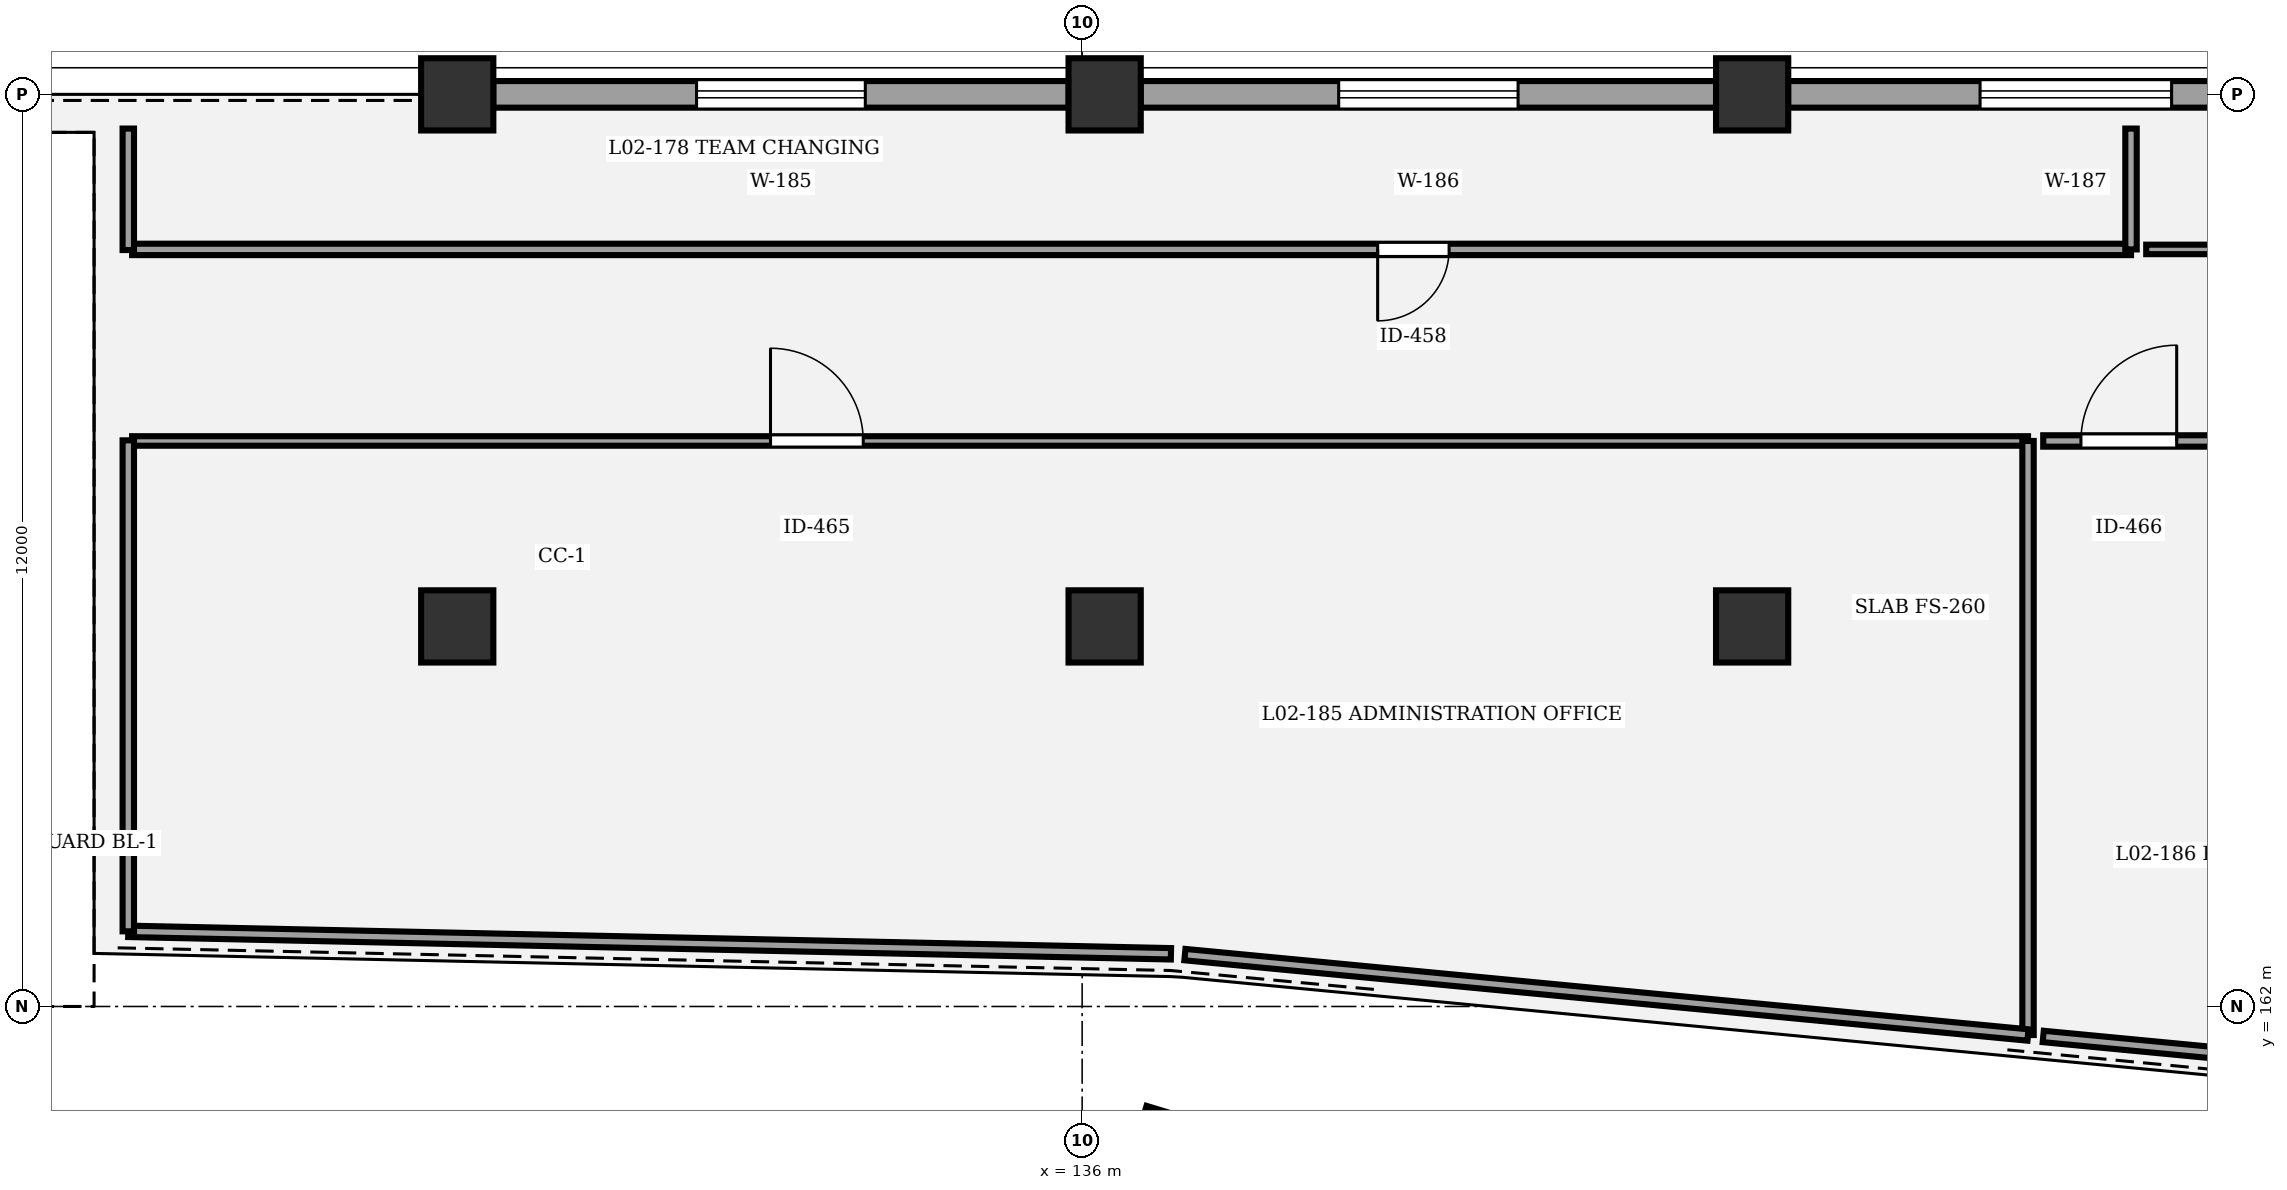
"""IFC4 building model, lengths in metres.
Left out: names, types, materials, properties, quantities, classifications, styles, units other than length and angle.
Written with IfcOpenShell. Run it as: python <this file> out.ifc"""

import sys

from ifc_helpers import new_model, si_unit, direction, frame, frame_2d, origin, origin_2d, place, context, subcontext, project, spatial, rectangle, circle, extrude, element, fill, save


model = new_model("IFC4")
c1 = context("Model", 3, precision=1e-05, world=origin(), true_north=direction((0.0, 1.0)))
c2 = subcontext(c1, "Body", "Model", "MODEL_VIEW")
j1 = project(units=[si_unit("LENGTHUNIT", "METRE"), si_unit("PLANEANGLEUNIT", "RADIAN")], contexts=[c1])
p1 = place(None, origin())
s1 = spatial("IfcSite", under=j1, at=p1, CompositionType="ELEMENT")
p2 = place(p1, origin())
s2 = spatial("IfcBuilding", under=s1, at=p2, CompositionType="ELEMENT")
p3 = place(p2, frame((0.0, 0.0, 10.2)))
s3 = spatial("IfcBuildingStorey", under=s2, at=p3, CompositionType="ELEMENT", Elevation=10.2)
p4 = place(p3, frame((137.115, 160.194, 0.0), z_axis=(0.0, 0.0, 1.0), x_axis=(0.289198876314, 0.957269037387, 0.0)))
e1 = element("IfcColumn", 1, at=p4, inside=s3, PredefinedType="COLUMN", context=c2, shape_type="SweptSolid", body=[
    extrude(rectangle(XDim=0.8, YDim=0.8, at=origin_2d()), origin(), (0.0, 0.0, 1.0), 4.5),
])
for number, where, z_axis, x_axis in (
    (2, (127.778, 167.0, 0.0), (0.0, 0.0, 1.0), (1.0, 0.0, 0.0)),
    (3, (127.778, 174.0, 0.0), (0.0, 0.0, 1.0), (1.0, 0.0, 0.0)),
    (4, (136.296, 167.0, 0.0), (0.0, 0.0, 1.0), (1.0, 0.0, 0.0)),
    (5, (136.296, 174.0, 0.0), (0.0, 0.0, 1.0), (1.0, 0.0, 0.0)),
    (6, (144.815, 167.0, 0.0), (0.0, 0.0, 1.0), (1.0, 0.0, 0.0)),
    (7, (144.815, 174.0, 0.0), (0.0, 0.0, 1.0), (1.0, 0.0, 0.0)),
):
    element("IfcColumn", number, at=place(p3, frame(where, z_axis=z_axis, x_axis=x_axis)), inside=s3, PredefinedType="COLUMN", context=c2, shape_type="SweptSolid", body=[
        extrude(circle(Radius=0.475, at=origin_2d()), origin(), (0.0, 0.0, 1.0), 4.5),
    ])
p5 = place(p3, frame((128.251, 174.0, 0.0), z_axis=(0.0, 0.0, 1.0), x_axis=(1.0, 0.0, 0.0)))
e8 = element("IfcWall", 8, at=p5, inside=s3, PredefinedType="STANDARD", context=c2, shape_type="SweptSolid", body=[
    extrude(rectangle(XDim=7.572, YDim=0.35, at=frame_2d((3.786, 0.0))), origin(), (0.0, 0.0, 1.0), 3.26),
])
p6 = place(p5, frame((2.676, 0.0, 0.9)))
e9 = element("IfcOpeningElement", 9, at=p6, cuts=e8, PredefinedType="OPENING", context=c2, shape_type="SweptSolid", body=[
    extrude(rectangle(XDim=2.22, YDim=1.55, at=frame_2d((1.11, 0.775))), frame((0.0, 0.185, 0.0), z_axis=(0.0, -1.0, 0.0), x_axis=(1.0, 0.0, 0.0)), (0.0, 0.0, 1.0), 0.37),
])
p7 = place(p3, frame((136.769, 174.0, 0.0), z_axis=(0.0, 0.0, 1.0), x_axis=(1.0, 0.0, 0.0)))
e10 = element("IfcWall", 10, at=p7, inside=s3, PredefinedType="STANDARD", context=c2, shape_type="SweptSolid", body=[
    extrude(rectangle(XDim=7.573, YDim=0.35, at=frame_2d((3.787, 0.0))), origin(), (0.0, 0.0, 1.0), 3.26),
])
p8 = place(p7, frame((2.606, 0.0, 0.9)))
e11 = element("IfcOpeningElement", 11, at=p8, cuts=e10, PredefinedType="OPENING", context=c2, shape_type="SweptSolid", body=[
    extrude(rectangle(XDim=2.36, YDim=1.55, at=frame_2d((1.18, 0.775))), frame((0.0, 0.185, 0.0), z_axis=(0.0, -1.0, 0.0), x_axis=(1.0, 0.0, 0.0)), (0.0, 0.0, 1.0), 0.37),
])
p9 = place(p3, frame((145.288, 174.0, 0.0), z_axis=(0.0, 0.0, 1.0), x_axis=(1.0, 0.0, 0.0)))
e12 = element("IfcWall", 12, at=p9, inside=s3, PredefinedType="STANDARD", context=c2, shape_type="SweptSolid", body=[
    extrude(rectangle(XDim=7.572, YDim=0.35, at=frame_2d((3.786, 0.0))), origin(), (0.0, 0.0, 1.0), 3.26),
])
p10 = place(p9, frame((2.526, 0.0, 0.9)))
e13 = element("IfcOpeningElement", 13, at=p10, cuts=e12, PredefinedType="OPENING", context=c2, shape_type="SweptSolid", body=[
    extrude(rectangle(XDim=2.52, YDim=1.55, at=frame_2d((1.26, 0.775))), frame((0.0, 0.185, 0.0), z_axis=(0.0, -1.0, 0.0), x_axis=(1.0, 0.0, 0.0)), (0.0, 0.0, 1.0), 0.37),
])
p11 = place(p3, frame((149.8, 171.96, 0.0), z_axis=(0.0, 0.0, 1.0), x_axis=(-1.0, 0.0, 0.0)))
e14 = element("IfcWall", 14, at=p11, inside=s3, PredefinedType="PARTITIONING", context=c2, shape_type="SweptSolid", body=[
    extrude(rectangle(XDim=26.3, YDim=0.15, at=frame_2d((13.15, 0.0))), origin(), (0.0, 0.0, 1.0), 3.25),
])
p12 = place(p11, frame((8.972, 0.0, 0.0)))
e15 = element("IfcOpeningElement", 15, at=p12, cuts=e14, PredefinedType="OPENING", context=c2, shape_type="SweptSolid", body=[
    extrude(rectangle(XDim=0.94, YDim=2.3, at=frame_2d((0.47, 1.15))), frame((0.0, 0.085, 0.0), z_axis=(0.0, -1.0, 0.0), x_axis=(1.0, 0.0, 0.0)), (0.0, 0.0, 1.0), 0.17),
])
p13 = place(p3, frame((176.1, 171.96, 0.0), z_axis=(0.0, 0.0, 1.0), x_axis=(-1.0, 0.0, 0.0)))
e16 = element("IfcWall", 16, at=p13, inside=s3, PredefinedType="PARTITIONING", context=c2, shape_type="SweptSolid", body=[
    extrude(rectangle(XDim=26.1, YDim=0.125, at=frame_2d((13.05, 0.0))), origin(), (0.0, 0.0, 1.0), 3.25),
])
p14 = place(p13, frame((1.544, 0.0, 0.0)))
e17 = element("IfcOpeningElement", 17, at=p14, cuts=e16, PredefinedType="OPENING", context=c2, shape_type="SweptSolid", body=[
    extrude(rectangle(XDim=0.98, YDim=2.3, at=frame_2d((0.49, 1.15))), frame((0.0, 0.073, 0.0), z_axis=(0.0, -1.0, 0.0), x_axis=(1.0, 0.0, 0.0)), (0.0, 0.0, 1.0), 0.145),
])
p15 = place(p3, frame((123.5, 169.44, 0.0), z_axis=(0.0, 0.0, 1.0), x_axis=(1.0, 0.0, 0.0)))
e18 = element("IfcWall", 18, at=p15, inside=s3, PredefinedType="PARTITIONING", context=c2, shape_type="SweptSolid", body=[
    extrude(rectangle(XDim=24.945, YDim=0.125, at=frame_2d((12.473, 0.0))), origin(), (0.0, 0.0, 1.0), 3.25),
])
p16 = place(p15, frame((8.4, 0.0, 0.0)))
e19 = element("IfcOpeningElement", 19, at=p16, cuts=e18, PredefinedType="OPENING", context=c2, shape_type="SweptSolid", body=[
    extrude(rectangle(XDim=1.22, YDim=2.3, at=frame_2d((0.61, 1.15))), frame((0.0, 0.073, 0.0), z_axis=(0.0, -1.0, 0.0), x_axis=(1.0, 0.0, 0.0)), (0.0, 0.0, 1.0), 0.145),
])
p17 = place(p3, frame((148.645, 169.44, 0.0), z_axis=(0.0, 0.0, 1.0), x_axis=(1.0, 0.0, 0.0)))
e20 = element("IfcWall", 20, at=p17, inside=s3, PredefinedType="PARTITIONING", context=c2, shape_type="SweptSolid", body=[
    extrude(rectangle(XDim=5.42, YDim=0.15, at=frame_2d((2.71, 0.0))), origin(), (0.0, 0.0, 1.0), 3.25),
])
p18 = place(p17, frame((0.496, 0.0, 0.0)))
e21 = element("IfcOpeningElement", 21, at=p18, cuts=e20, PredefinedType="OPENING", context=c2, shape_type="SweptSolid", body=[
    extrude(rectangle(XDim=1.26, YDim=2.3, at=frame_2d((0.63, 1.15))), frame((0.0, 0.085, 0.0), z_axis=(0.0, -1.0, 0.0), x_axis=(1.0, 0.0, 0.0)), (0.0, 0.0, 1.0), 0.17),
])
p19 = place(p3, frame((123.45, 171.952, 0.0), z_axis=(0.0, 0.0, 1.0), x_axis=(0.0, 1.0, 0.0)))
e22 = element("IfcWall", 22, at=p19, inside=s3, PredefinedType="PARTITIONING", context=c2, shape_type="SweptSolid", body=[
    extrude(rectangle(XDim=1.598, YDim=0.15, at=frame_2d((0.799, 0.0))), origin(), (0.0, 0.0, 1.0), 3.25),
])
p20 = place(p3, frame((149.8, 173.55, 0.0), z_axis=(0.0, 0.0, 1.0), x_axis=(0.0, -1.0, 0.0)))
e23 = element("IfcWall", 23, at=p20, inside=s3, PredefinedType="PARTITIONING", context=c2, shape_type="SweptSolid", body=[
    extrude(rectangle(XDim=1.59, YDim=0.15, at=frame_2d((0.795, 0.0))), origin(), (0.0, 0.0, 1.0), 3.25),
])
p21 = place(p3, frame((137.168, 162.693, 0.0), z_axis=(0.0, 0.0, 1.0), x_axis=(-0.999768230535, 0.021528706714, 0.0)))
e24 = element("IfcWall", 24, at=p21, inside=s3, PredefinedType="PARTITIONING", context=c2, shape_type="SweptSolid", body=[
    extrude(rectangle(XDim=13.722, YDim=0.15, at=frame_2d((6.861, 0.0))), origin(), (0.0, 0.0, 1.0), 3.25),
])
p22 = place(p3, frame((123.45, 162.989, 0.0), z_axis=(0.0, 0.0, 1.0), x_axis=(0.0, 1.0, 0.0)))
e25 = element("IfcWall", 25, at=p22, inside=s3, PredefinedType="PARTITIONING", context=c2, shape_type="SweptSolid", body=[
    extrude(rectangle(XDim=6.46, YDim=0.15, at=frame_2d((3.23, 0.0))), origin(), (0.0, 0.0, 1.0), 3.25),
])
p23 = place(p3, frame((148.445, 169.44, 0.0), z_axis=(0.0, 0.0, 1.0), x_axis=(0.0, -1.0, 0.0)))
e26 = element("IfcWall", 26, at=p23, inside=s3, PredefinedType="PARTITIONING", context=c2, shape_type="SweptSolid", body=[
    extrude(rectangle(XDim=7.815, YDim=0.15, at=frame_2d((3.908, 0.0))), origin(), (0.0, 0.0, 1.0), 3.25),
])
p24 = place(p3, frame((148.445, 161.625, 0.0), z_axis=(0.0, 0.0, 1.0), x_axis=(-0.995483944756, 0.094930057059, 0.0)))
e27 = element("IfcWall", 27, at=p24, inside=s3, PredefinedType="PARTITIONING", context=c2, shape_type="SweptSolid", body=[
    extrude(rectangle(XDim=11.144, YDim=0.15, at=frame_2d((5.572, 0.0))), origin(), (0.0, 0.0, 1.0), 3.25),
])
p25 = place(p3, frame((152.31, 161.256, 0.0), z_axis=(0.0, 0.0, 1.0), x_axis=(-0.995481155674, 0.094959300221, 0.0)))
e28 = element("IfcWall", 28, at=p25, inside=s3, PredefinedType="PARTITIONING", context=c2, shape_type="SweptSolid", body=[
    extrude(rectangle(XDim=3.682, YDim=0.15, at=frame_2d((1.841, 0.0))), origin(), (0.0, 0.0, 1.0), 3.25),
])
p26 = place(p6, origin())
e29 = element("IfcWindow", 29, at=p26, inside=s3, PartitioningType="SINGLE_PANEL", PredefinedType="WINDOW", context=c2, shape_type="SweptSolid", body=[
    extrude(rectangle(XDim=2.22, YDim=1.55, at=frame_2d((1.11, 0.775))), frame((0.0, 0.03, 0.0), z_axis=(0.0, -1.0, 0.0), x_axis=(1.0, 0.0, 0.0)), (0.0, 0.0, 1.0), 0.06),
])
fill(e9, e29)
p27 = place(p8, origin())
e30 = element("IfcWindow", 30, at=p27, inside=s3, PartitioningType="SINGLE_PANEL", PredefinedType="WINDOW", context=c2, shape_type="SweptSolid", body=[
    extrude(rectangle(XDim=2.36, YDim=1.55, at=frame_2d((1.18, 0.775))), frame((0.0, 0.03, 0.0), z_axis=(0.0, -1.0, 0.0), x_axis=(1.0, 0.0, 0.0)), (0.0, 0.0, 1.0), 0.06),
])
fill(e11, e30)
p28 = place(p10, origin())
e31 = element("IfcWindow", 31, at=p28, inside=s3, PartitioningType="SINGLE_PANEL", PredefinedType="WINDOW", context=c2, shape_type="SweptSolid", body=[
    extrude(rectangle(XDim=2.52, YDim=1.55, at=frame_2d((1.26, 0.775))), frame((0.0, 0.03, 0.0), z_axis=(0.0, -1.0, 0.0), x_axis=(1.0, 0.0, 0.0)), (0.0, 0.0, 1.0), 0.06),
])
fill(e13, e31)
p29 = place(p12, origin())
e32 = element("IfcDoor", 32, at=p29, inside=s3, OperationType="SINGLE_SWING_RIGHT", PredefinedType="DOOR", context=c2, shape_type="SweptSolid", body=[
    extrude(rectangle(XDim=0.94, YDim=2.3, at=frame_2d((0.47, 1.15))), frame((0.0, 0.025, 0.0), z_axis=(0.0, -1.0, 0.0), x_axis=(1.0, 0.0, 0.0)), (0.0, 0.0, 1.0), 0.05),
])
fill(e15, e32)
p30 = place(p16, origin())
e33 = element("IfcDoor", 33, at=p30, inside=s3, OperationType="SINGLE_SWING_LEFT", PredefinedType="DOOR", context=c2, shape_type="SweptSolid", body=[
    extrude(rectangle(XDim=1.22, YDim=2.3, at=frame_2d((0.61, 1.15))), frame((0.0, 0.025, 0.0), z_axis=(0.0, -1.0, 0.0), x_axis=(1.0, 0.0, 0.0)), (0.0, 0.0, 1.0), 0.05),
])
fill(e19, e33)
p31 = place(p18, origin())
e34 = element("IfcDoor", 34, at=p31, inside=s3, OperationType="SINGLE_SWING_RIGHT", PredefinedType="DOOR", context=c2, shape_type="SweptSolid", body=[
    extrude(rectangle(XDim=1.26, YDim=2.3, at=frame_2d((0.63, 1.15))), frame((0.0, 0.025, 0.0), z_axis=(0.0, -1.0, 0.0), x_axis=(1.0, 0.0, 0.0)), (0.0, 0.0, 1.0), 0.05),
])
fill(e21, e34)
save(model, sys.argv[1])
